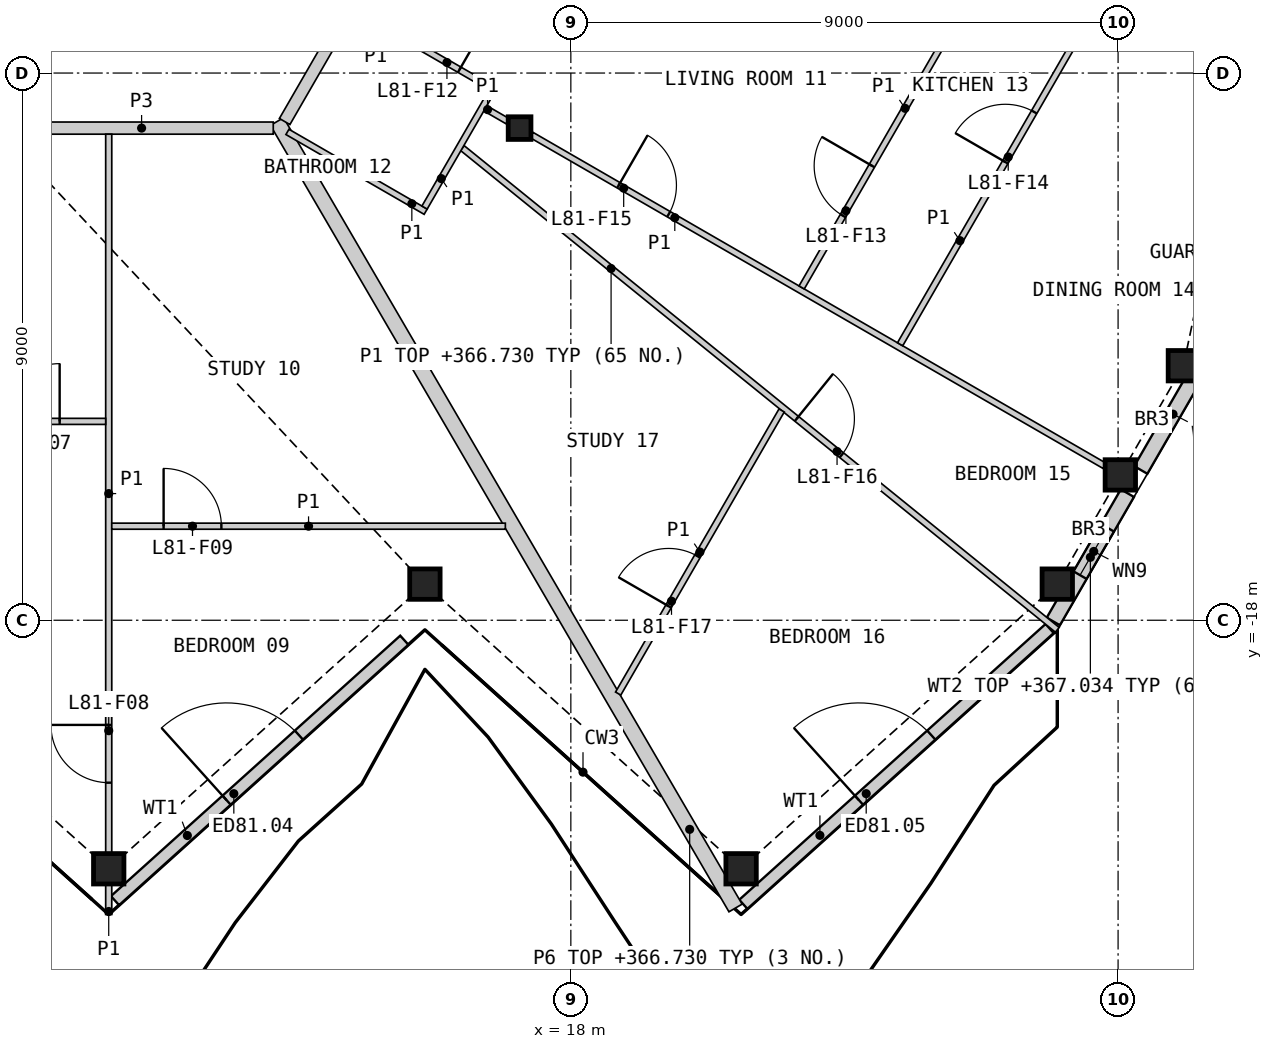
"""IFC4 building model, lengths in metres.
Left out: names, types, materials, properties, quantities, classifications, styles, units other than length and angle.
Written with IfcOpenShell. Run it as: python <this file> out.ifc"""

import sys

from ifc_helpers import new_model, si_unit, direction, frame, frame_2d, origin, origin_2d, place, context, subcontext, project, spatial, rectangle, hollow_rectangle, i_section, extrude, element, fill, save


model = new_model("IFC4")
c1 = context("Model", 3, precision=1e-05, world=origin(), true_north=direction((0.0, 1.0)))
c2 = subcontext(c1, "Body", "Model", "MODEL_VIEW")
j1 = project(units=[si_unit("LENGTHUNIT", "METRE"), si_unit("PLANEANGLEUNIT", "RADIAN")], contexts=[c1])
p1 = place(None, origin())
s1 = spatial("IfcSite", under=j1, at=p1, CompositionType="ELEMENT")
p2 = place(p1, origin())
s2 = spatial("IfcBuilding", under=s1, at=p2, CompositionType="ELEMENT")
p3 = place(p2, frame((0.0, 0.0, 364.4)))
s3 = spatial("IfcBuildingStorey", under=s2, at=p3, CompositionType="ELEMENT", Elevation=364.4)
for number, where, z_axis, x_axis in (
    (1, (10.4, -22.088, 0.0), (0.0, 0.0, 1.0), (1.0, 0.0, 0.0)),
    (2, (15.6, -17.406, 0.0), (0.0, 0.0, 1.0), (1.0, 0.0, 0.0)),
    (3, (20.8, -22.088, 0.0), (0.0, 0.0, 1.0), (1.0, 0.0, 0.0)),
    (4, (26.0, -17.406, 0.0), (0.0, 0.0, 1.0), (1.0, 0.0, 0.0)),
    (5, (27.037, -15.61, 0.0), (0.0, 0.0, 1.0), (1.0, 0.0, 0.0)),
    (6, (28.074, -13.814, 0.0), (0.0, 0.0, 1.0), (1.0, 0.0, 0.0)),
):
    element("IfcColumn", number, at=place(p3, frame(where, z_axis=z_axis, x_axis=x_axis)), inside=s3, PredefinedType="COLUMN", context=c2, shape_type="SweptSolid", body=[
        extrude(hollow_rectangle(XDim=0.5, YDim=0.5, WallThickness=0.03, at=origin_2d()), origin(), (0.0, 0.0, 1.0), 3.4),
    ])
p4 = place(p3, frame((17.157, -9.906, 0.0), z_axis=(0.0, 0.0, 1.0), x_axis=(1.0, 0.0, 0.0)))
e7 = element("IfcColumn", 7, at=p4, inside=s3, PredefinedType="COLUMN", context=c2, shape_type="SweptSolid", body=[
    extrude(i_section(OverallWidth=0.374, OverallDepth=0.372, WebThickness=0.016, FlangeThickness=0.026, at=origin_2d()), origin(), (0.0, 0.0, 1.0), 3.4),
])
p5 = place(p3, frame((10.503, -22.612, 0.0), z_axis=(0.0, 0.0, 1.0), x_axis=(0.743148117717, 0.669126949939, 0.0)))
e8 = element("IfcWall", 8, at=p5, inside=s3, PredefinedType="SOLIDWALL", context=c2, shape_type="SweptSolid", body=[
    extrude(rectangle(XDim=6.402, YDim=0.2, at=frame_2d((3.201, 0.0))), origin(), (0.0, 0.0, 1.0), 2.634),
])
p6 = place(p5, frame((2.469, 0.0, 0.0)))
e9 = element("IfcOpeningElement", 9, at=p6, cuts=e8, PredefinedType="OPENING", context=c2, shape_type="SweptSolid", body=[
    extrude(rectangle(XDim=1.6, YDim=2.25, at=frame_2d((0.8, 1.125))), frame((0.0, 0.11, 0.0), z_axis=(0.0, -1.0, 0.0), x_axis=(1.0, 0.0, 0.0)), (0.0, 0.0, 1.0), 0.22),
])
p7 = place(p3, frame((20.837, -22.672, 0.0), z_axis=(0.0, 0.0, 1.0), x_axis=(0.743143698099, 0.669131858437, 0.0)))
e10 = element("IfcWall", 10, at=p7, inside=s3, PredefinedType="SOLIDWALL", context=c2, shape_type="SweptSolid", body=[
    extrude(rectangle(XDim=6.779, YDim=0.2, at=frame_2d((3.389, 0.0))), origin(), (0.0, 0.0, 1.0), 2.634),
])
p8 = place(p7, frame((2.559, 0.0, 0.0)))
e11 = element("IfcOpeningElement", 11, at=p8, cuts=e10, PredefinedType="OPENING", context=c2, shape_type="SweptSolid", body=[
    extrude(rectangle(XDim=1.6, YDim=2.25, at=frame_2d((0.8, 1.125))), frame((0.0, 0.11, 0.0), z_axis=(0.0, -1.0, 0.0), x_axis=(1.0, 0.0, 0.0)), (0.0, 0.0, 1.0), 0.22),
])
p9 = place(p3, frame((25.935, -18.02, 0.0), z_axis=(0.0, 0.0, 1.0), x_axis=(0.500028873844, 0.866008732821, 0.0)))
e12 = element("IfcWall", 12, at=p9, inside=s3, PredefinedType="SOLIDWALL", context=c2, shape_type="SweptSolid", body=[
    extrude(rectangle(XDim=2.437, YDim=0.25, at=frame_2d((1.218, 0.0))), origin(), (0.0, 0.0, 1.0), 2.634),
])
p10 = place(p9, frame((0.88, 0.0, 0.6)))
e13 = element("IfcOpeningElement", 13, at=p10, cuts=e12, PredefinedType="OPENING", context=c2, shape_type="SweptSolid", body=[
    extrude(rectangle(XDim=0.9, YDim=1.8, at=frame_2d((0.45, 0.9))), frame((0.0, 0.135, 0.0), z_axis=(0.0, -1.0, 0.0), x_axis=(1.0, 0.0, 0.0)), (0.0, 0.0, 1.0), 0.27),
])
p11 = place(p3, frame((27.374, -15.528, 0.0), z_axis=(0.0, 0.0, 1.0), x_axis=(0.499941779639, 0.866059014716, 0.0)))
e14 = element("IfcWall", 14, at=p11, inside=s3, PredefinedType="SOLIDWALL", context=c2, shape_type="SweptSolid", body=[
    extrude(rectangle(XDim=2.12, YDim=0.25, at=frame_2d((1.06, 0.0))), origin(), (0.0, 0.0, 1.0), 2.634),
])
p12 = place(p3, frame((13.168, -9.798, 0.0), z_axis=(0.0, 0.0, 1.0), x_axis=(0.503632750219, -0.863917850786, 0.0)))
e15 = element("IfcWall", 15, at=p12, inside=s3, PredefinedType="PARTITIONING", context=c2, shape_type="SweptSolid", body=[
    extrude(rectangle(XDim=14.972, YDim=0.25, at=frame_2d((7.486, 0.0))), origin(), (0.0, 0.0, 1.0), 2.33),
])
p13 = place(p3, frame((8.775, -9.906, 0.0), z_axis=(0.0, 0.0, 1.0), x_axis=(1.0, 0.0, 0.0)))
e16 = element("IfcWall", 16, at=p13, inside=s3, PredefinedType="PARTITIONING", context=c2, shape_type="SweptSolid", body=[
    extrude(rectangle(XDim=4.331, YDim=0.2, at=frame_2d((2.165, 0.0))), origin(), (0.0, 0.0, 1.0), 3.1),
])
p14 = place(p3, frame((13.293, -9.797, 0.0), z_axis=(0.0, 0.0, 1.0), x_axis=(0.499977520935, 0.86603838169, 0.0)))
e17 = element("IfcWall", 17, at=p14, inside=s3, PredefinedType="PARTITIONING", context=c2, shape_type="SweptSolid", body=[
    extrude(rectangle(XDim=3.701, YDim=0.2, at=frame_2d((1.851, 0.0))), origin(), (0.0, 0.0, 1.0), 3.1),
])
p15 = place(p14, frame((2.451, 0.0, 0.0)))
e18 = element("IfcOpeningElement", 18, at=p15, cuts=e17, PredefinedType="OPENING", context=c2, shape_type="SweptSolid", body=[
    extrude(rectangle(XDim=1.0, YDim=2.1, at=frame_2d((0.5, 1.05))), frame((0.0, 0.11, 0.0), z_axis=(0.0, -1.0, 0.0), x_axis=(1.0, 0.0, 0.0)), (0.0, 0.0, 1.0), 0.22),
])
p16 = place(p3, frame((16.216, -10.234, 0.0), z_axis=(0.0, 0.0, 1.0), x_axis=(0.777145059662, -0.629321504672, 0.0)))
e19 = element("IfcWall", 19, at=p16, inside=s3, PredefinedType="PARTITIONING", context=c2, shape_type="SweptSolid", body=[
    extrude(rectangle(XDim=12.59, YDim=0.1, at=frame_2d((6.295, 0.0))), origin(), (0.0, 0.0, 1.0), 2.33),
])
p17 = place(p16, frame((7.074, 0.0, 0.0)))
e20 = element("IfcOpeningElement", 20, at=p17, cuts=e19, PredefinedType="OPENING", context=c2, shape_type="SweptSolid", body=[
    extrude(rectangle(XDim=0.95, YDim=2.1, at=frame_2d((0.475, 1.05))), frame((0.0, 0.06, 0.0), z_axis=(0.0, -1.0, 0.0), x_axis=(1.0, 0.0, 0.0)), (0.0, 0.0, 1.0), 0.12),
])
p18 = place(p3, frame((10.4, -21.828, 0.0), z_axis=(0.0, 0.0, 1.0), x_axis=(0.0, 1.0, 0.0)))
e21 = element("IfcWall", 21, at=p18, inside=s3, PredefinedType="PARTITIONING", context=c2, shape_type="SweptSolid", body=[
    extrude(rectangle(XDim=11.822, YDim=0.1, at=frame_2d((5.911, 0.0))), origin(), (0.0, 0.0, 1.0), 2.33),
])
p19 = place(p18, frame((1.156, 0.0, 0.0)))
e22 = element("IfcOpeningElement", 22, at=p19, cuts=e21, PredefinedType="OPENING", context=c2, shape_type="SweptSolid", body=[
    extrude(rectangle(XDim=0.95, YDim=2.1, at=frame_2d((0.475, 1.05))), frame((0.0, 0.06, 0.0), z_axis=(0.0, -1.0, 0.0), x_axis=(1.0, 0.0, 0.0)), (0.0, 0.0, 1.0), 0.12),
])
p20 = place(p3, frame((17.354, -10.019, 0.0), z_axis=(0.0, 0.0, 1.0), x_axis=(0.866019680922, -0.500009912158, 0.0)))
e23 = element("IfcWall", 23, at=p20, inside=s3, PredefinedType="PARTITIONING", context=c2, shape_type="SweptSolid", body=[
    extrude(rectangle(XDim=10.881, YDim=0.1, at=frame_2d((5.44, 0.0))), origin(), (0.0, 0.0, 1.0), 2.33),
])
p21 = place(p20, frame((1.655, 0.0, 0.0)))
e24 = element("IfcOpeningElement", 24, at=p21, cuts=e23, PredefinedType="OPENING", context=c2, shape_type="SweptSolid", body=[
    extrude(rectangle(XDim=0.95, YDim=2.1, at=frame_2d((0.475, 1.05))), frame((0.0, 0.06, 0.0), z_axis=(0.0, -1.0, 0.0), x_axis=(1.0, 0.0, 0.0)), (0.0, 0.0, 1.0), 0.12),
])
p22 = place(p3, frame((23.415, -13.461, 0.0), z_axis=(0.0, 0.0, 1.0), x_axis=(0.500011483804, 0.866018773506, 0.0)))
e25 = element("IfcWall", 25, at=p22, inside=s3, PredefinedType="PARTITIONING", context=c2, shape_type="SweptSolid", body=[
    extrude(rectangle(XDim=7.872, YDim=0.1, at=frame_2d((3.936, 0.0))), origin(), (0.0, 0.0, 1.0), 2.33),
])
p23 = place(p22, frame((3.461, 0.0, 0.0)))
e26 = element("IfcOpeningElement", 26, at=p23, cuts=e25, PredefinedType="OPENING", context=c2, shape_type="SweptSolid", body=[
    extrude(rectangle(XDim=0.95, YDim=2.1, at=frame_2d((0.475, 1.05))), frame((0.0, 0.06, 0.0), z_axis=(0.0, -1.0, 0.0), x_axis=(1.0, 0.0, 0.0)), (0.0, 0.0, 1.0), 0.12),
])
p24 = place(p3, frame((21.796, -12.526, 0.0), z_axis=(0.0, 0.0, 1.0), x_axis=(0.499994777381, 0.866028419044, 0.0)))
e27 = element("IfcWall", 27, at=p24, inside=s3, PredefinedType="PARTITIONING", context=c2, shape_type="SweptSolid", body=[
    extrude(rectangle(XDim=6.803, YDim=0.1, at=frame_2d((3.402, 0.0))), origin(), (0.0, 0.0, 1.0), 2.33),
])
p25 = place(p24, frame((1.361, 0.0, 0.0)))
e28 = element("IfcOpeningElement", 28, at=p25, cuts=e27, PredefinedType="OPENING", context=c2, shape_type="SweptSolid", body=[
    extrude(rectangle(XDim=0.95, YDim=2.1, at=frame_2d((0.475, 1.05))), frame((0.0, 0.06, 0.0), z_axis=(0.0, -1.0, 0.0), x_axis=(1.0, 0.0, 0.0)), (0.0, 0.0, 1.0), 0.12),
])
p26 = place(p3, frame((10.45, -16.453, 0.0), z_axis=(0.0, 0.0, 1.0), x_axis=(1.0, 0.0, 0.0)))
e29 = element("IfcWall", 29, at=p26, inside=s3, PredefinedType="PARTITIONING", context=c2, shape_type="SweptSolid", body=[
    extrude(rectangle(XDim=6.473, YDim=0.1, at=frame_2d((3.236, 0.0))), origin(), (0.0, 0.0, 1.0), 2.33),
])
p27 = place(p26, frame((0.853, 0.0, 0.0)))
e30 = element("IfcOpeningElement", 30, at=p27, cuts=e29, PredefinedType="OPENING", context=c2, shape_type="SweptSolid", body=[
    extrude(rectangle(XDim=0.95, YDim=2.1, at=frame_2d((0.475, 1.05))), frame((0.0, 0.06, 0.0), z_axis=(0.0, -1.0, 0.0), x_axis=(1.0, 0.0, 0.0)), (0.0, 0.0, 1.0), 0.12),
])
p28 = place(p3, frame((18.778, -19.206, 0.0), z_axis=(0.0, 0.0, 1.0), x_axis=(0.499992359988, 0.866029814703, 0.0)))
e31 = element("IfcWall", 31, at=p28, inside=s3, PredefinedType="PARTITIONING", context=c2, shape_type="SweptSolid", body=[
    extrude(rectangle(XDim=5.376, YDim=0.1, at=frame_2d((2.688, 0.0))), origin(), (0.0, 0.0, 1.0), 2.33),
])
p29 = place(p28, frame((1.659, 0.0, 0.0)))
e32 = element("IfcOpeningElement", 32, at=p29, cuts=e31, PredefinedType="OPENING", context=c2, shape_type="SweptSolid", body=[
    extrude(rectangle(XDim=0.95, YDim=2.1, at=frame_2d((0.475, 1.05))), frame((0.0, 0.06, 0.0), z_axis=(0.0, -1.0, 0.0), x_axis=(1.0, 0.0, 0.0)), (0.0, 0.0, 1.0), 0.12),
])
p30 = place(p3, frame((5.25, -14.729, 0.0), z_axis=(0.0, 0.0, 1.0), x_axis=(1.0, 0.0, 0.0)))
e33 = element("IfcWall", 33, at=p30, inside=s3, PredefinedType="PARTITIONING", context=c2, shape_type="SweptSolid", body=[
    extrude(rectangle(XDim=5.1, YDim=0.1, at=frame_2d((2.55, 0.0))), origin(), (0.0, 0.0, 1.0), 2.33),
])
p31 = place(p30, frame((3.393, 0.0, 0.0)))
e34 = element("IfcOpeningElement", 34, at=p31, cuts=e33, PredefinedType="OPENING", context=c2, shape_type="SweptSolid", body=[
    extrude(rectangle(XDim=0.95, YDim=2.1, at=frame_2d((0.475, 1.05))), frame((0.0, 0.06, 0.0), z_axis=(0.0, -1.0, 0.0), x_axis=(1.0, 0.0, 0.0)), (0.0, 0.0, 1.0), 0.12),
])
p32 = place(p3, frame((14.467, -7.964, 0.0), z_axis=(0.0, 0.0, 1.0), x_axis=(0.86601223543, -0.500022807565, 0.0)))
e35 = element("IfcWall", 35, at=p32, inside=s3, PredefinedType="PARTITIONING", context=c2, shape_type="SweptSolid", body=[
    extrude(rectangle(XDim=2.65, YDim=0.1, at=frame_2d((1.325, 0.0))), origin(), (0.0, 0.0, 1.0), 2.33),
])
p33 = place(p32, frame((1.014, 0.0, 0.0)))
e36 = element("IfcOpeningElement", 36, at=p33, cuts=e35, PredefinedType="OPENING", context=c2, shape_type="SweptSolid", body=[
    extrude(rectangle(XDim=0.95, YDim=2.1, at=frame_2d((0.475, 1.05))), frame((0.0, 0.06, 0.0), z_axis=(0.0, -1.0, 0.0), x_axis=(1.0, 0.0, 0.0)), (0.0, 0.0, 1.0), 0.12),
])
p34 = place(p3, frame((13.339, -9.968, 0.0), z_axis=(0.0, 0.0, 1.0), x_axis=(0.866013657776, -0.500020344131, 0.0)))
e37 = element("IfcWall", 37, at=p34, inside=s3, PredefinedType="PARTITIONING", context=c2, shape_type="SweptSolid", body=[
    extrude(rectangle(XDim=2.625, YDim=0.1, at=frame_2d((1.312, 0.0))), origin(), (0.0, 0.0, 1.0), 2.33),
])
p35 = place(p3, frame((15.594, -11.212, 0.0), z_axis=(0.0, 0.0, 1.0), x_axis=(0.499981787252, 0.866035918664, 0.0)))
e38 = element("IfcWall", 38, at=p35, inside=s3, PredefinedType="PARTITIONING", context=c2, shape_type="SweptSolid", body=[
    extrude(rectangle(XDim=2.2, YDim=0.1, at=frame_2d((1.1, 0.0))), origin(), (0.0, 0.0, 1.0), 2.33),
])
p36 = place(p3, frame((10.4, -22.839, 0.0), z_axis=(0.0, 0.0, 1.0), x_axis=(0.0, 1.0, 0.0)))
e39 = element("IfcWall", 39, at=p36, inside=s3, PredefinedType="PARTITIONING", context=c2, shape_type="SweptSolid", body=[
    extrude(rectangle(XDim=0.491, YDim=0.1, at=frame_2d((0.246, 0.0))), origin(), (0.0, 0.0, 1.0), 2.33),
])
p37 = place(p3, frame((16.594, -9.581, 0.0), z_axis=(0.0, 0.0, 1.0), x_axis=(0.866137484628, -0.499805820016, 0.0)))
e40 = element("IfcWall", 40, at=p37, inside=s3, PredefinedType="PARTITIONING", context=c2, shape_type="SweptSolid", body=[
    extrude(rectangle(XDim=0.423, YDim=0.1, at=frame_2d((0.211, 0.0))), origin(), (0.0, 0.0, 1.0), 2.33),
])
p38 = place(p6, origin())
e41 = element("IfcDoor", 41, at=p38, inside=s3, OperationType="DOUBLE_DOOR_SINGLE_SWING", PredefinedType="DOOR", context=c2, shape_type="SweptSolid", body=[
    extrude(rectangle(XDim=1.6, YDim=2.25, at=frame_2d((0.8, 1.125))), frame((0.0, 0.025, 0.0), z_axis=(0.0, -1.0, 0.0), x_axis=(1.0, 0.0, 0.0)), (0.0, 0.0, 1.0), 0.05),
])
fill(e9, e41)
p39 = place(p8, origin())
e42 = element("IfcDoor", 42, at=p39, inside=s3, OperationType="DOUBLE_DOOR_SINGLE_SWING", PredefinedType="DOOR", context=c2, shape_type="SweptSolid", body=[
    extrude(rectangle(XDim=1.6, YDim=2.25, at=frame_2d((0.8, 1.125))), frame((0.0, 0.025, 0.0), z_axis=(0.0, -1.0, 0.0), x_axis=(1.0, 0.0, 0.0)), (0.0, 0.0, 1.0), 0.05),
])
fill(e11, e42)
p40 = place(p10, origin())
e43 = element("IfcWindow", 43, at=p40, inside=s3, PartitioningType="SINGLE_PANEL", PredefinedType="WINDOW", context=c2, shape_type="SweptSolid", body=[
    extrude(rectangle(XDim=0.9, YDim=1.8, at=frame_2d((0.45, 0.9))), frame((0.0, 0.03, 0.0), z_axis=(0.0, -1.0, 0.0), x_axis=(1.0, 0.0, 0.0)), (0.0, 0.0, 1.0), 0.06),
])
fill(e13, e43)
p41 = place(p31, origin())
e44 = element("IfcDoor", 44, at=p41, inside=s3, OperationType="SINGLE_SWING_RIGHT", PredefinedType="DOOR", context=c2, shape_type="SweptSolid", body=[
    extrude(rectangle(XDim=0.95, YDim=2.1, at=frame_2d((0.475, 1.05))), frame((0.0, 0.025, 0.0), z_axis=(0.0, -1.0, 0.0), x_axis=(1.0, 0.0, 0.0)), (0.0, 0.0, 1.0), 0.05),
])
fill(e34, e44)
p42 = place(p19, origin())
e45 = element("IfcDoor", 45, at=p42, inside=s3, OperationType="SINGLE_SWING_RIGHT", PredefinedType="DOOR", context=c2, shape_type="SweptSolid", body=[
    extrude(rectangle(XDim=0.95, YDim=2.1, at=frame_2d((0.475, 1.05))), frame((0.0, 0.025, 0.0), z_axis=(0.0, -1.0, 0.0), x_axis=(1.0, 0.0, 0.0)), (0.0, 0.0, 1.0), 0.05),
])
fill(e22, e45)
p43 = place(p27, origin())
e46 = element("IfcDoor", 46, at=p43, inside=s3, OperationType="SINGLE_SWING_LEFT", PredefinedType="DOOR", context=c2, shape_type="SweptSolid", body=[
    extrude(rectangle(XDim=0.95, YDim=2.1, at=frame_2d((0.475, 1.05))), frame((0.0, 0.025, 0.0), z_axis=(0.0, -1.0, 0.0), x_axis=(1.0, 0.0, 0.0)), (0.0, 0.0, 1.0), 0.05),
])
fill(e30, e46)
p44 = place(p33, origin())
e47 = element("IfcDoor", 47, at=p44, inside=s3, OperationType="SINGLE_SWING_RIGHT", PredefinedType="DOOR", context=c2, shape_type="SweptSolid", body=[
    extrude(rectangle(XDim=0.95, YDim=2.1, at=frame_2d((0.475, 1.05))), frame((0.0, 0.025, 0.0), z_axis=(0.0, -1.0, 0.0), x_axis=(1.0, 0.0, 0.0)), (0.0, 0.0, 1.0), 0.05),
])
fill(e36, e47)
p45 = place(p25, origin())
e48 = element("IfcDoor", 48, at=p45, inside=s3, OperationType="SINGLE_SWING_RIGHT", PredefinedType="DOOR", context=c2, shape_type="SweptSolid", body=[
    extrude(rectangle(XDim=0.95, YDim=2.1, at=frame_2d((0.475, 1.05))), frame((0.0, 0.025, 0.0), z_axis=(0.0, -1.0, 0.0), x_axis=(1.0, 0.0, 0.0)), (0.0, 0.0, 1.0), 0.05),
])
fill(e28, e48)
p46 = place(p23, origin())
e49 = element("IfcDoor", 49, at=p46, inside=s3, OperationType="SINGLE_SWING_LEFT", PredefinedType="DOOR", context=c2, shape_type="SweptSolid", body=[
    extrude(rectangle(XDim=0.95, YDim=2.1, at=frame_2d((0.475, 1.05))), frame((0.0, 0.025, 0.0), z_axis=(0.0, -1.0, 0.0), x_axis=(1.0, 0.0, 0.0)), (0.0, 0.0, 1.0), 0.05),
])
fill(e26, e49)
p47 = place(p21, origin())
e50 = element("IfcDoor", 50, at=p47, inside=s3, OperationType="SINGLE_SWING_LEFT", PredefinedType="DOOR", context=c2, shape_type="SweptSolid", body=[
    extrude(rectangle(XDim=0.95, YDim=2.1, at=frame_2d((0.475, 1.05))), frame((0.0, 0.025, 0.0), z_axis=(0.0, -1.0, 0.0), x_axis=(1.0, 0.0, 0.0)), (0.0, 0.0, 1.0), 0.05),
])
fill(e24, e50)
p48 = place(p17, origin())
e51 = element("IfcDoor", 51, at=p48, inside=s3, OperationType="SINGLE_SWING_LEFT", PredefinedType="DOOR", context=c2, shape_type="SweptSolid", body=[
    extrude(rectangle(XDim=0.95, YDim=2.1, at=frame_2d((0.475, 1.05))), frame((0.0, 0.025, 0.0), z_axis=(0.0, -1.0, 0.0), x_axis=(1.0, 0.0, 0.0)), (0.0, 0.0, 1.0), 0.05),
])
fill(e20, e51)
p49 = place(p29, origin())
e52 = element("IfcDoor", 52, at=p49, inside=s3, OperationType="SINGLE_SWING_LEFT", PredefinedType="DOOR", context=c2, shape_type="SweptSolid", body=[
    extrude(rectangle(XDim=0.95, YDim=2.1, at=frame_2d((0.475, 1.05))), frame((0.0, 0.025, 0.0), z_axis=(0.0, -1.0, 0.0), x_axis=(1.0, 0.0, 0.0)), (0.0, 0.0, 1.0), 0.05),
])
fill(e32, e52)
save(model, sys.argv[1])
